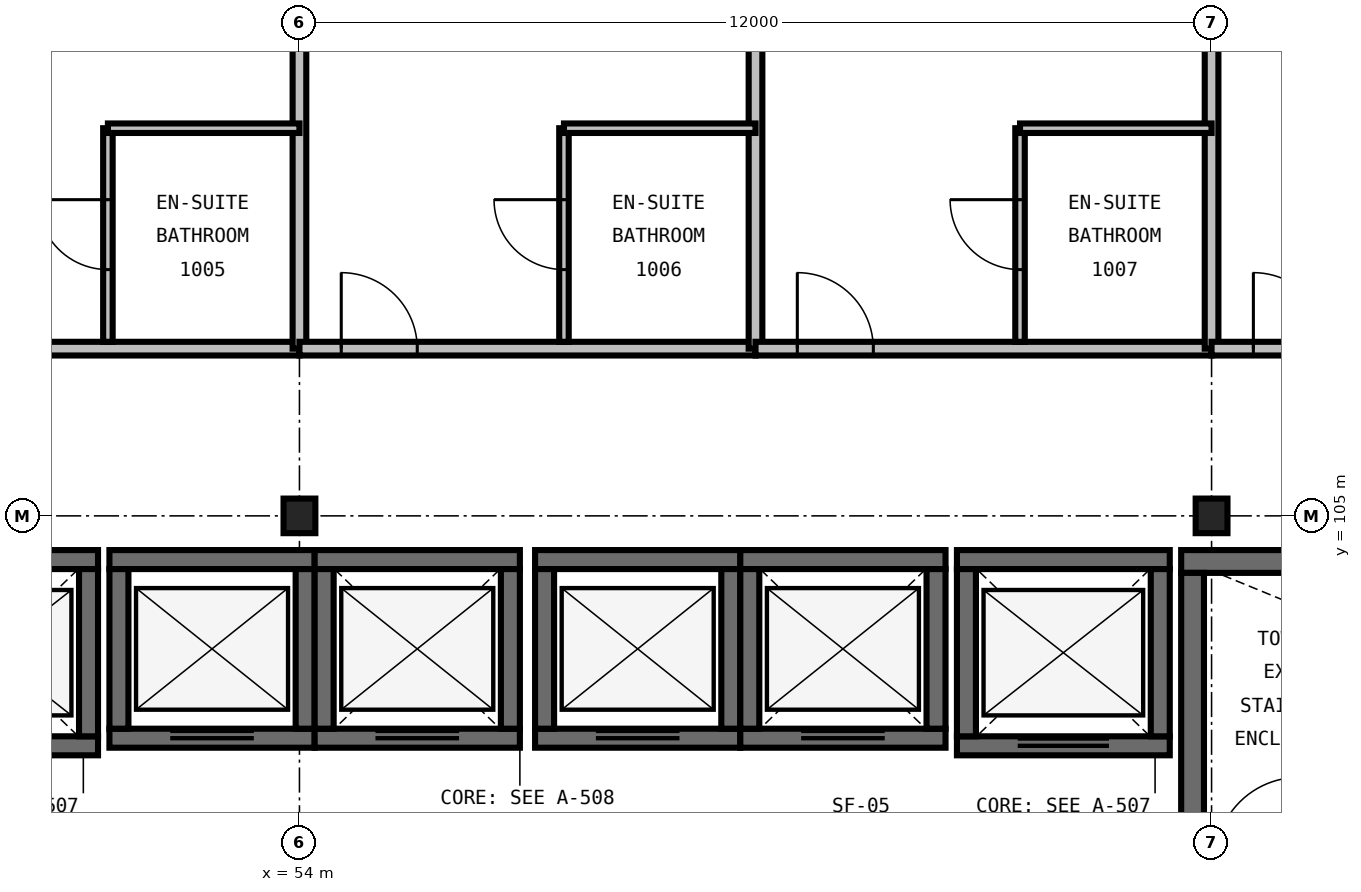
"""IFC4 building model, lengths in metres.
Left out: names, types, materials, properties, quantities, classifications, styles, units other than length and angle.
Written with IfcOpenShell. Run it as: python <this file> out.ifc"""

import sys

from ifc_helpers import new_model, si_unit, direction, frame, frame_2d, origin, origin_2d, place, context, subcontext, project, spatial, rectangle, i_section, extrude, element, fill, save


model = new_model("IFC4")
c1 = context("Model", 3, precision=1e-05, world=origin(), true_north=direction((0.0, 1.0)))
c2 = subcontext(c1, "Body", "Model", "MODEL_VIEW")
j1 = project(units=[si_unit("LENGTHUNIT", "METRE"), si_unit("PLANEANGLEUNIT", "RADIAN")], contexts=[c1])
p1 = place(None, origin())
s1 = spatial("IfcSite", under=j1, at=p1, CompositionType="ELEMENT")
p2 = place(p1, origin())
s2 = spatial("IfcBuilding", under=s1, at=p2, CompositionType="ELEMENT")
p3 = place(p2, frame((0.0, 0.0, 45.6)))
s3 = spatial("IfcBuildingStorey", under=s2, at=p3, CompositionType="ELEMENT", Elevation=45.6)
for number, where, z_axis, x_axis in (
    (1, (54.0, 105.0, 0.0), (0.0, 0.0, 1.0), (1.0, 0.0, 0.0)),
    (2, (66.0, 105.0, 0.0), (0.0, 0.0, 1.0), (1.0, 0.0, 0.0)),
):
    element("IfcColumn", number, at=place(p3, frame(where, z_axis=z_axis, x_axis=x_axis)), inside=s3, PredefinedType="COLUMN", context=c2, shape_type="SweptSolid", body=[
        extrude(i_section(OverallWidth=0.419, OverallDepth=0.455, WebThickness=0.042, FlangeThickness=0.068, FilletRadius=0.031, at=origin_2d()), origin(), (0.0, 0.0, 1.0), 3.6),
    ])
p4 = place(p3, frame((75.4, 104.4, 0.0), z_axis=(0.0, 0.0, 1.0), x_axis=(-1.0, 0.0, 0.0)))
e3 = element("IfcWall", 3, at=p4, inside=s3, PredefinedType="SHEAR", context=c2, shape_type="SweptSolid", body=[
    extrude(rectangle(XDim=9.8, YDim=0.3, at=frame_2d((4.9, 0.0))), origin(), (0.0, 0.0, 1.0), 3.6),
])
p5 = place(p3, frame((65.75, 104.25, 0.0), z_axis=(0.0, 0.0, 1.0), x_axis=(0.0, -1.0, 0.0)))
e4 = element("IfcWall", 4, at=p5, inside=s3, PredefinedType="SHEAR", context=c2, shape_type="SweptSolid", body=[
    extrude(rectangle(XDim=3.64, YDim=0.3, at=frame_2d((1.82, 0.0))), origin(), (0.0, 0.0, 1.0), 3.6),
])
p6 = place(p3, frame((48.55, 101.975, 0.0), z_axis=(0.0, 0.0, 1.0), x_axis=(1.0, 0.0, 0.0)))
e5 = element("IfcWall", 5, at=p6, inside=s3, PredefinedType="SHEAR", context=c2, shape_type="SweptSolid", body=[
    extrude(rectangle(XDim=2.8, YDim=0.25, at=frame_2d((1.4, 0.0))), origin(), (0.0, 0.0, 1.0), 3.6),
])
p7 = place(p6, frame((0.8, 0.0, 0.0)))
e6 = element("IfcOpeningElement", 6, at=p7, cuts=e5, PredefinedType="OPENING", context=c2, shape_type="SweptSolid", body=[
    extrude(rectangle(XDim=1.2, YDim=2.2, at=frame_2d((0.6, 1.1))), frame((0.0, 0.14, 0.0), z_axis=(0.0, -1.0, 0.0), x_axis=(1.0, 0.0, 0.0)), (0.0, 0.0, 1.0), 0.28),
])
p8 = place(p3, frame((51.35, 104.425, 0.0), z_axis=(0.0, 0.0, 1.0), x_axis=(-1.0, 0.0, 0.0)))
e7 = element("IfcWall", 7, at=p8, inside=s3, PredefinedType="SHEAR", context=c2, shape_type="SweptSolid", body=[
    extrude(rectangle(XDim=2.8, YDim=0.25, at=frame_2d((1.4, 0.0))), origin(), (0.0, 0.0, 1.0), 3.6),
])
p9 = place(p3, frame((51.225, 102.1, 0.0), z_axis=(0.0, 0.0, 1.0), x_axis=(0.0, 1.0, 0.0)))
e8 = element("IfcWall", 8, at=p9, inside=s3, PredefinedType="SHEAR", context=c2, shape_type="SweptSolid", body=[
    extrude(rectangle(XDim=2.2, YDim=0.25, at=frame_2d((1.1, 0.0))), origin(), (0.0, 0.0, 1.0), 3.6),
])
p10 = place(p3, frame((62.65, 101.975, 0.0), z_axis=(0.0, 0.0, 1.0), x_axis=(1.0, 0.0, 0.0)))
e9 = element("IfcWall", 9, at=p10, inside=s3, PredefinedType="SHEAR", context=c2, shape_type="SweptSolid", body=[
    extrude(rectangle(XDim=2.8, YDim=0.25, at=frame_2d((1.4, 0.0))), origin(), (0.0, 0.0, 1.0), 3.6),
])
p11 = place(p10, frame((0.8, 0.0, 0.0)))
e10 = element("IfcOpeningElement", 10, at=p11, cuts=e9, PredefinedType="OPENING", context=c2, shape_type="SweptSolid", body=[
    extrude(rectangle(XDim=1.2, YDim=2.2, at=frame_2d((0.6, 1.1))), frame((0.0, 0.14, 0.0), z_axis=(0.0, -1.0, 0.0), x_axis=(1.0, 0.0, 0.0)), (0.0, 0.0, 1.0), 0.28),
])
p12 = place(p3, frame((65.45, 104.425, 0.0), z_axis=(0.0, 0.0, 1.0), x_axis=(-1.0, 0.0, 0.0)))
e11 = element("IfcWall", 11, at=p12, inside=s3, PredefinedType="SHEAR", context=c2, shape_type="SweptSolid", body=[
    extrude(rectangle(XDim=2.8, YDim=0.25, at=frame_2d((1.4, 0.0))), origin(), (0.0, 0.0, 1.0), 3.6),
])
for number, where, z_axis, x_axis in (
    (12, (62.775, 104.3, 0.0), (0.0, 0.0, 1.0), (0.0, -1.0, 0.0)),
    (13, (65.325, 102.1, 0.0), (0.0, 0.0, 1.0), (0.0, 1.0, 0.0)),
):
    element("IfcWall", number, at=place(p3, frame(where, z_axis=z_axis, x_axis=x_axis)), inside=s3, PredefinedType="SHEAR", context=c2, shape_type="SweptSolid", body=[
        extrude(rectangle(XDim=2.2, YDim=0.25, at=frame_2d((1.1, 0.0))), origin(), (0.0, 0.0, 1.0), 3.6),
    ])
p13 = place(p3, frame((51.5, 102.075, 0.0), z_axis=(0.0, 0.0, 1.0), x_axis=(1.0, 0.0, 0.0)))
e14 = element("IfcWall", 14, at=p13, inside=s3, PredefinedType="SHEAR", context=c2, shape_type="SweptSolid", body=[
    extrude(rectangle(XDim=2.7, YDim=0.25, at=frame_2d((1.35, 0.0))), origin(), (0.0, 0.0, 1.0), 3.6),
])
p14 = place(p13, frame((0.8, 0.0, 0.0)))
e15 = element("IfcOpeningElement", 15, at=p14, cuts=e14, PredefinedType="OPENING", context=c2, shape_type="SweptSolid", body=[
    extrude(rectangle(XDim=1.1, YDim=2.2, at=frame_2d((0.55, 1.1))), frame((0.0, 0.14, 0.0), z_axis=(0.0, -1.0, 0.0), x_axis=(1.0, 0.0, 0.0)), (0.0, 0.0, 1.0), 0.28),
])
p15 = place(p3, frame((54.2, 104.425, 0.0), z_axis=(0.0, 0.0, 1.0), x_axis=(-1.0, 0.0, 0.0)))
e16 = element("IfcWall", 16, at=p15, inside=s3, PredefinedType="SHEAR", context=c2, shape_type="SweptSolid", body=[
    extrude(rectangle(XDim=2.7, YDim=0.25, at=frame_2d((1.35, 0.0))), origin(), (0.0, 0.0, 1.0), 3.6),
])
for number, where, z_axis, x_axis in (
    (17, (51.625, 104.3, 0.0), (0.0, 0.0, 1.0), (0.0, -1.0, 0.0)),
    (18, (54.075, 102.2, 0.0), (0.0, 0.0, 1.0), (0.0, 1.0, 0.0)),
):
    element("IfcWall", number, at=place(p3, frame(where, z_axis=z_axis, x_axis=x_axis)), inside=s3, PredefinedType="SHEAR", context=c2, shape_type="SweptSolid", body=[
        extrude(rectangle(XDim=2.1, YDim=0.25, at=frame_2d((1.05, 0.0))), origin(), (0.0, 0.0, 1.0), 3.6),
    ])
p16 = place(p3, frame((54.2, 102.075, 0.0), z_axis=(0.0, 0.0, 1.0), x_axis=(1.0, 0.0, 0.0)))
e19 = element("IfcWall", 19, at=p16, inside=s3, PredefinedType="SHEAR", context=c2, shape_type="SweptSolid", body=[
    extrude(rectangle(XDim=2.7, YDim=0.25, at=frame_2d((1.35, 0.0))), origin(), (0.0, 0.0, 1.0), 3.6),
])
p17 = place(p16, frame((0.8, 0.0, 0.0)))
e20 = element("IfcOpeningElement", 20, at=p17, cuts=e19, PredefinedType="OPENING", context=c2, shape_type="SweptSolid", body=[
    extrude(rectangle(XDim=1.1, YDim=2.2, at=frame_2d((0.55, 1.1))), frame((0.0, 0.14, 0.0), z_axis=(0.0, -1.0, 0.0), x_axis=(1.0, 0.0, 0.0)), (0.0, 0.0, 1.0), 0.28),
])
p18 = place(p3, frame((56.9, 104.425, 0.0), z_axis=(0.0, 0.0, 1.0), x_axis=(-1.0, 0.0, 0.0)))
e21 = element("IfcWall", 21, at=p18, inside=s3, PredefinedType="SHEAR", context=c2, shape_type="SweptSolid", body=[
    extrude(rectangle(XDim=2.7, YDim=0.25, at=frame_2d((1.35, 0.0))), origin(), (0.0, 0.0, 1.0), 3.6),
])
for number, where, z_axis, x_axis in (
    (22, (54.325, 104.3, 0.0), (0.0, 0.0, 1.0), (0.0, -1.0, 0.0)),
    (23, (56.775, 102.2, 0.0), (0.0, 0.0, 1.0), (0.0, 1.0, 0.0)),
):
    element("IfcWall", number, at=place(p3, frame(where, z_axis=z_axis, x_axis=x_axis)), inside=s3, PredefinedType="SHEAR", context=c2, shape_type="SweptSolid", body=[
        extrude(rectangle(XDim=2.1, YDim=0.25, at=frame_2d((1.05, 0.0))), origin(), (0.0, 0.0, 1.0), 3.6),
    ])
p19 = place(p3, frame((57.1, 102.075, 0.0), z_axis=(0.0, 0.0, 1.0), x_axis=(1.0, 0.0, 0.0)))
e24 = element("IfcWall", 24, at=p19, inside=s3, PredefinedType="SHEAR", context=c2, shape_type="SweptSolid", body=[
    extrude(rectangle(XDim=2.7, YDim=0.25, at=frame_2d((1.35, 0.0))), origin(), (0.0, 0.0, 1.0), 3.6),
])
p20 = place(p19, frame((0.8, 0.0, 0.0)))
e25 = element("IfcOpeningElement", 25, at=p20, cuts=e24, PredefinedType="OPENING", context=c2, shape_type="SweptSolid", body=[
    extrude(rectangle(XDim=1.1, YDim=2.2, at=frame_2d((0.55, 1.1))), frame((0.0, 0.14, 0.0), z_axis=(0.0, -1.0, 0.0), x_axis=(1.0, 0.0, 0.0)), (0.0, 0.0, 1.0), 0.28),
])
p21 = place(p3, frame((59.8, 104.425, 0.0), z_axis=(0.0, 0.0, 1.0), x_axis=(-1.0, 0.0, 0.0)))
e26 = element("IfcWall", 26, at=p21, inside=s3, PredefinedType="SHEAR", context=c2, shape_type="SweptSolid", body=[
    extrude(rectangle(XDim=2.7, YDim=0.25, at=frame_2d((1.35, 0.0))), origin(), (0.0, 0.0, 1.0), 3.6),
])
for number, where, z_axis, x_axis in (
    (27, (57.225, 104.3, 0.0), (0.0, 0.0, 1.0), (0.0, -1.0, 0.0)),
    (28, (59.675, 102.2, 0.0), (0.0, 0.0, 1.0), (0.0, 1.0, 0.0)),
):
    element("IfcWall", number, at=place(p3, frame(where, z_axis=z_axis, x_axis=x_axis)), inside=s3, PredefinedType="SHEAR", context=c2, shape_type="SweptSolid", body=[
        extrude(rectangle(XDim=2.1, YDim=0.25, at=frame_2d((1.05, 0.0))), origin(), (0.0, 0.0, 1.0), 3.6),
    ])
p22 = place(p3, frame((59.8, 102.075, 0.0), z_axis=(0.0, 0.0, 1.0), x_axis=(1.0, 0.0, 0.0)))
e29 = element("IfcWall", 29, at=p22, inside=s3, PredefinedType="SHEAR", context=c2, shape_type="SweptSolid", body=[
    extrude(rectangle(XDim=2.7, YDim=0.25, at=frame_2d((1.35, 0.0))), origin(), (0.0, 0.0, 1.0), 3.6),
])
p23 = place(p22, frame((0.8, 0.0, 0.0)))
e30 = element("IfcOpeningElement", 30, at=p23, cuts=e29, PredefinedType="OPENING", context=c2, shape_type="SweptSolid", body=[
    extrude(rectangle(XDim=1.1, YDim=2.2, at=frame_2d((0.55, 1.1))), frame((0.0, 0.14, 0.0), z_axis=(0.0, -1.0, 0.0), x_axis=(1.0, 0.0, 0.0)), (0.0, 0.0, 1.0), 0.28),
])
p24 = place(p3, frame((62.5, 104.425, 0.0), z_axis=(0.0, 0.0, 1.0), x_axis=(-1.0, 0.0, 0.0)))
e31 = element("IfcWall", 31, at=p24, inside=s3, PredefinedType="SHEAR", context=c2, shape_type="SweptSolid", body=[
    extrude(rectangle(XDim=2.7, YDim=0.25, at=frame_2d((1.35, 0.0))), origin(), (0.0, 0.0, 1.0), 3.6),
])
for number, where, z_axis, x_axis in (
    (32, (59.925, 104.3, 0.0), (0.0, 0.0, 1.0), (0.0, -1.0, 0.0)),
    (33, (62.375, 102.2, 0.0), (0.0, 0.0, 1.0), (0.0, 1.0, 0.0)),
):
    element("IfcWall", number, at=place(p3, frame(where, z_axis=z_axis, x_axis=x_axis)), inside=s3, PredefinedType="SHEAR", context=c2, shape_type="SweptSolid", body=[
        extrude(rectangle(XDim=2.1, YDim=0.25, at=frame_2d((1.05, 0.0))), origin(), (0.0, 0.0, 1.0), 3.6),
    ])
p25 = place(p3, frame((48.0, 107.2, 0.0), z_axis=(0.0, 0.0, 1.0), x_axis=(1.0, 0.0, 0.0)))
e34 = element("IfcWall", 34, at=p25, inside=s3, PredefinedType="PARTITIONING", context=c2, shape_type="SweptSolid", body=[
    extrude(rectangle(XDim=6.0, YDim=0.18, at=frame_2d((3.0, 0.0))), origin(), (0.0, 0.0, 1.0), 3.29),
])
p26 = place(p25, frame((0.55, 0.0, 0.0)))
e35 = element("IfcOpeningElement", 35, at=p26, cuts=e34, PredefinedType="OPENING", context=c2, shape_type="SweptSolid", body=[
    extrude(rectangle(XDim=1.0, YDim=2.15, at=frame_2d((0.5, 1.075))), frame((0.0, 0.105, 0.0), z_axis=(0.0, -1.0, 0.0), x_axis=(1.0, 0.0, 0.0)), (0.0, 0.0, 1.0), 0.21),
])
p27 = place(p3, frame((54.0, 107.2, 0.0), z_axis=(0.0, 0.0, 1.0), x_axis=(0.0, 1.0, 0.0)))
e36 = element("IfcWall", 36, at=p27, inside=s3, PredefinedType="PARTITIONING", context=c2, shape_type="SweptSolid", body=[
    extrude(rectangle(XDim=9.625, YDim=0.18, at=frame_2d((4.812, 0.0))), origin(), (0.0, 0.0, 1.0), 2.59),
])
p28 = place(p3, frame((51.48, 107.29, 0.0), z_axis=(0.0, 0.0, 1.0), x_axis=(0.0, 1.0, 0.0)))
e37 = element("IfcWall", 37, at=p28, inside=s3, PredefinedType="PARTITIONING", context=c2, shape_type="SweptSolid", body=[
    extrude(rectangle(XDim=2.81, YDim=0.125, at=frame_2d((1.405, 0.0))), origin(), (0.0, 0.0, 1.0), 3.29),
])
p29 = place(p28, frame((0.95, 0.0, 0.0)))
e38 = element("IfcOpeningElement", 38, at=p29, cuts=e37, PredefinedType="OPENING", context=c2, shape_type="SweptSolid", body=[
    extrude(rectangle(XDim=0.92, YDim=2.1, at=frame_2d((0.46, 1.05))), frame((0.0, 0.077, 0.0), z_axis=(0.0, -1.0, 0.0), x_axis=(1.0, 0.0, 0.0)), (0.0, 0.0, 1.0), 0.155),
])
p30 = place(p3, frame((51.48, 110.1, 0.0), z_axis=(0.0, 0.0, 1.0), x_axis=(1.0, 0.0, 0.0)))
e39 = element("IfcWall", 39, at=p30, inside=s3, PredefinedType="PARTITIONING", context=c2, shape_type="SweptSolid", body=[
    extrude(rectangle(XDim=2.52, YDim=0.125, at=frame_2d((1.26, 0.0))), origin(), (0.0, 0.0, 1.0), 3.29),
])
p31 = place(p3, frame((54.0, 107.2, 0.0), z_axis=(0.0, 0.0, 1.0), x_axis=(1.0, 0.0, 0.0)))
e40 = element("IfcWall", 40, at=p31, inside=s3, PredefinedType="PARTITIONING", context=c2, shape_type="SweptSolid", body=[
    extrude(rectangle(XDim=6.0, YDim=0.18, at=frame_2d((3.0, 0.0))), origin(), (0.0, 0.0, 1.0), 3.29),
])
p32 = place(p31, frame((0.55, 0.0, 0.0)))
e41 = element("IfcOpeningElement", 41, at=p32, cuts=e40, PredefinedType="OPENING", context=c2, shape_type="SweptSolid", body=[
    extrude(rectangle(XDim=1.0, YDim=2.15, at=frame_2d((0.5, 1.075))), frame((0.0, 0.105, 0.0), z_axis=(0.0, -1.0, 0.0), x_axis=(1.0, 0.0, 0.0)), (0.0, 0.0, 1.0), 0.21),
])
p33 = place(p3, frame((60.0, 107.2, 0.0), z_axis=(0.0, 0.0, 1.0), x_axis=(0.0, 1.0, 0.0)))
e42 = element("IfcWall", 42, at=p33, inside=s3, PredefinedType="PARTITIONING", context=c2, shape_type="SweptSolid", body=[
    extrude(rectangle(XDim=9.625, YDim=0.18, at=frame_2d((4.812, 0.0))), origin(), (0.0, 0.0, 1.0), 3.29),
])
p34 = place(p3, frame((57.48, 107.29, 0.0), z_axis=(0.0, 0.0, 1.0), x_axis=(0.0, 1.0, 0.0)))
e43 = element("IfcWall", 43, at=p34, inside=s3, PredefinedType="PARTITIONING", context=c2, shape_type="SweptSolid", body=[
    extrude(rectangle(XDim=2.81, YDim=0.125, at=frame_2d((1.405, 0.0))), origin(), (0.0, 0.0, 1.0), 3.29),
])
p35 = place(p34, frame((0.95, 0.0, 0.0)))
e44 = element("IfcOpeningElement", 44, at=p35, cuts=e43, PredefinedType="OPENING", context=c2, shape_type="SweptSolid", body=[
    extrude(rectangle(XDim=0.92, YDim=2.1, at=frame_2d((0.46, 1.05))), frame((0.0, 0.077, 0.0), z_axis=(0.0, -1.0, 0.0), x_axis=(1.0, 0.0, 0.0)), (0.0, 0.0, 1.0), 0.155),
])
p36 = place(p3, frame((57.48, 110.1, 0.0), z_axis=(0.0, 0.0, 1.0), x_axis=(1.0, 0.0, 0.0)))
e45 = element("IfcWall", 45, at=p36, inside=s3, PredefinedType="PARTITIONING", context=c2, shape_type="SweptSolid", body=[
    extrude(rectangle(XDim=2.52, YDim=0.125, at=frame_2d((1.26, 0.0))), origin(), (0.0, 0.0, 1.0), 3.29),
])
p37 = place(p3, frame((60.0, 107.2, 0.0), z_axis=(0.0, 0.0, 1.0), x_axis=(1.0, 0.0, 0.0)))
e46 = element("IfcWall", 46, at=p37, inside=s3, PredefinedType="PARTITIONING", context=c2, shape_type="SweptSolid", body=[
    extrude(rectangle(XDim=6.0, YDim=0.18, at=frame_2d((3.0, 0.0))), origin(), (0.0, 0.0, 1.0), 3.29),
])
p38 = place(p37, frame((0.55, 0.0, 0.0)))
e47 = element("IfcOpeningElement", 47, at=p38, cuts=e46, PredefinedType="OPENING", context=c2, shape_type="SweptSolid", body=[
    extrude(rectangle(XDim=1.0, YDim=2.15, at=frame_2d((0.5, 1.075))), frame((0.0, 0.105, 0.0), z_axis=(0.0, -1.0, 0.0), x_axis=(1.0, 0.0, 0.0)), (0.0, 0.0, 1.0), 0.21),
])
p39 = place(p3, frame((66.0, 107.2, 0.0), z_axis=(0.0, 0.0, 1.0), x_axis=(0.0, 1.0, 0.0)))
e48 = element("IfcWall", 48, at=p39, inside=s3, PredefinedType="PARTITIONING", context=c2, shape_type="SweptSolid", body=[
    extrude(rectangle(XDim=9.625, YDim=0.18, at=frame_2d((4.812, 0.0))), origin(), (0.0, 0.0, 1.0), 2.59),
])
p40 = place(p3, frame((63.48, 107.29, 0.0), z_axis=(0.0, 0.0, 1.0), x_axis=(0.0, 1.0, 0.0)))
e49 = element("IfcWall", 49, at=p40, inside=s3, PredefinedType="PARTITIONING", context=c2, shape_type="SweptSolid", body=[
    extrude(rectangle(XDim=2.81, YDim=0.125, at=frame_2d((1.405, 0.0))), origin(), (0.0, 0.0, 1.0), 3.29),
])
p41 = place(p40, frame((0.95, 0.0, 0.0)))
e50 = element("IfcOpeningElement", 50, at=p41, cuts=e49, PredefinedType="OPENING", context=c2, shape_type="SweptSolid", body=[
    extrude(rectangle(XDim=0.92, YDim=2.1, at=frame_2d((0.46, 1.05))), frame((0.0, 0.077, 0.0), z_axis=(0.0, -1.0, 0.0), x_axis=(1.0, 0.0, 0.0)), (0.0, 0.0, 1.0), 0.155),
])
p42 = place(p3, frame((63.48, 110.1, 0.0), z_axis=(0.0, 0.0, 1.0), x_axis=(1.0, 0.0, 0.0)))
e51 = element("IfcWall", 51, at=p42, inside=s3, PredefinedType="PARTITIONING", context=c2, shape_type="SweptSolid", body=[
    extrude(rectangle(XDim=2.52, YDim=0.125, at=frame_2d((1.26, 0.0))), origin(), (0.0, 0.0, 1.0), 3.29),
])
p43 = place(p3, frame((66.0, 107.2, 0.0), z_axis=(0.0, 0.0, 1.0), x_axis=(1.0, 0.0, 0.0)))
e52 = element("IfcWall", 52, at=p43, inside=s3, PredefinedType="PARTITIONING", context=c2, shape_type="SweptSolid", body=[
    extrude(rectangle(XDim=6.0, YDim=0.18, at=frame_2d((3.0, 0.0))), origin(), (0.0, 0.0, 1.0), 3.29),
])
p44 = place(p43, frame((0.55, 0.0, 0.0)))
e53 = element("IfcOpeningElement", 53, at=p44, cuts=e52, PredefinedType="OPENING", context=c2, shape_type="SweptSolid", body=[
    extrude(rectangle(XDim=1.0, YDim=2.15, at=frame_2d((0.5, 1.075))), frame((0.0, 0.105, 0.0), z_axis=(0.0, -1.0, 0.0), x_axis=(1.0, 0.0, 0.0)), (0.0, 0.0, 1.0), 0.21),
])
p45 = place(p11, origin())
e54 = element("IfcDoor", 54, at=p45, inside=s3, OperationType="DOUBLE_DOOR_SLIDING", PredefinedType="DOOR", context=c2, shape_type="SweptSolid", body=[
    extrude(rectangle(XDim=1.2, YDim=2.2, at=frame_2d((0.6, 1.1))), frame((0.0, 0.025, 0.0), z_axis=(0.0, -1.0, 0.0), x_axis=(1.0, 0.0, 0.0)), (0.0, 0.0, 1.0), 0.05),
])
fill(e10, e54)
p46 = place(p14, origin())
e55 = element("IfcDoor", 55, at=p46, inside=s3, OperationType="DOUBLE_DOOR_SLIDING", PredefinedType="DOOR", context=c2, shape_type="SweptSolid", body=[
    extrude(rectangle(XDim=1.1, YDim=2.2, at=frame_2d((0.55, 1.1))), frame((0.0, 0.025, 0.0), z_axis=(0.0, -1.0, 0.0), x_axis=(1.0, 0.0, 0.0)), (0.0, 0.0, 1.0), 0.05),
])
fill(e15, e55)
p47 = place(p17, origin())
e56 = element("IfcDoor", 56, at=p47, inside=s3, OperationType="DOUBLE_DOOR_SLIDING", PredefinedType="DOOR", context=c2, shape_type="SweptSolid", body=[
    extrude(rectangle(XDim=1.1, YDim=2.2, at=frame_2d((0.55, 1.1))), frame((0.0, 0.025, 0.0), z_axis=(0.0, -1.0, 0.0), x_axis=(1.0, 0.0, 0.0)), (0.0, 0.0, 1.0), 0.05),
])
fill(e20, e56)
p48 = place(p20, origin())
e57 = element("IfcDoor", 57, at=p48, inside=s3, OperationType="DOUBLE_DOOR_SLIDING", PredefinedType="DOOR", context=c2, shape_type="SweptSolid", body=[
    extrude(rectangle(XDim=1.1, YDim=2.2, at=frame_2d((0.55, 1.1))), frame((0.0, 0.025, 0.0), z_axis=(0.0, -1.0, 0.0), x_axis=(1.0, 0.0, 0.0)), (0.0, 0.0, 1.0), 0.05),
])
fill(e25, e57)
p49 = place(p23, origin())
e58 = element("IfcDoor", 58, at=p49, inside=s3, OperationType="DOUBLE_DOOR_SLIDING", PredefinedType="DOOR", context=c2, shape_type="SweptSolid", body=[
    extrude(rectangle(XDim=1.1, YDim=2.2, at=frame_2d((0.55, 1.1))), frame((0.0, 0.025, 0.0), z_axis=(0.0, -1.0, 0.0), x_axis=(1.0, 0.0, 0.0)), (0.0, 0.0, 1.0), 0.05),
])
fill(e30, e58)
p50 = place(p29, origin())
e59 = element("IfcDoor", 59, at=p50, inside=s3, OperationType="SINGLE_SWING_RIGHT", PredefinedType="DOOR", context=c2, shape_type="SweptSolid", body=[
    extrude(rectangle(XDim=0.92, YDim=2.1, at=frame_2d((0.46, 1.05))), frame((0.0, 0.025, 0.0), z_axis=(0.0, -1.0, 0.0), x_axis=(1.0, 0.0, 0.0)), (0.0, 0.0, 1.0), 0.05),
])
fill(e38, e59)
p51 = place(p32, origin())
e60 = element("IfcDoor", 60, at=p51, inside=s3, OperationType="SINGLE_SWING_LEFT", PredefinedType="DOOR", context=c2, shape_type="SweptSolid", body=[
    extrude(rectangle(XDim=1.0, YDim=2.15, at=frame_2d((0.5, 1.075))), frame((0.0, 0.025, 0.0), z_axis=(0.0, -1.0, 0.0), x_axis=(1.0, 0.0, 0.0)), (0.0, 0.0, 1.0), 0.05),
])
fill(e41, e60)
p52 = place(p35, origin())
e61 = element("IfcDoor", 61, at=p52, inside=s3, OperationType="SINGLE_SWING_RIGHT", PredefinedType="DOOR", context=c2, shape_type="SweptSolid", body=[
    extrude(rectangle(XDim=0.92, YDim=2.1, at=frame_2d((0.46, 1.05))), frame((0.0, 0.025, 0.0), z_axis=(0.0, -1.0, 0.0), x_axis=(1.0, 0.0, 0.0)), (0.0, 0.0, 1.0), 0.05),
])
fill(e44, e61)
p53 = place(p38, origin())
e62 = element("IfcDoor", 62, at=p53, inside=s3, OperationType="SINGLE_SWING_LEFT", PredefinedType="DOOR", context=c2, shape_type="SweptSolid", body=[
    extrude(rectangle(XDim=1.0, YDim=2.15, at=frame_2d((0.5, 1.075))), frame((0.0, 0.025, 0.0), z_axis=(0.0, -1.0, 0.0), x_axis=(1.0, 0.0, 0.0)), (0.0, 0.0, 1.0), 0.05),
])
fill(e47, e62)
p54 = place(p41, origin())
e63 = element("IfcDoor", 63, at=p54, inside=s3, OperationType="SINGLE_SWING_RIGHT", PredefinedType="DOOR", context=c2, shape_type="SweptSolid", body=[
    extrude(rectangle(XDim=0.92, YDim=2.1, at=frame_2d((0.46, 1.05))), frame((0.0, 0.025, 0.0), z_axis=(0.0, -1.0, 0.0), x_axis=(1.0, 0.0, 0.0)), (0.0, 0.0, 1.0), 0.05),
])
fill(e50, e63)
p55 = place(p44, origin())
e64 = element("IfcDoor", 64, at=p55, inside=s3, OperationType="SINGLE_SWING_LEFT", PredefinedType="DOOR", context=c2, shape_type="SweptSolid", body=[
    extrude(rectangle(XDim=1.0, YDim=2.15, at=frame_2d((0.5, 1.075))), frame((0.0, 0.025, 0.0), z_axis=(0.0, -1.0, 0.0), x_axis=(1.0, 0.0, 0.0)), (0.0, 0.0, 1.0), 0.05),
])
fill(e53, e64)
save(model, sys.argv[1])
